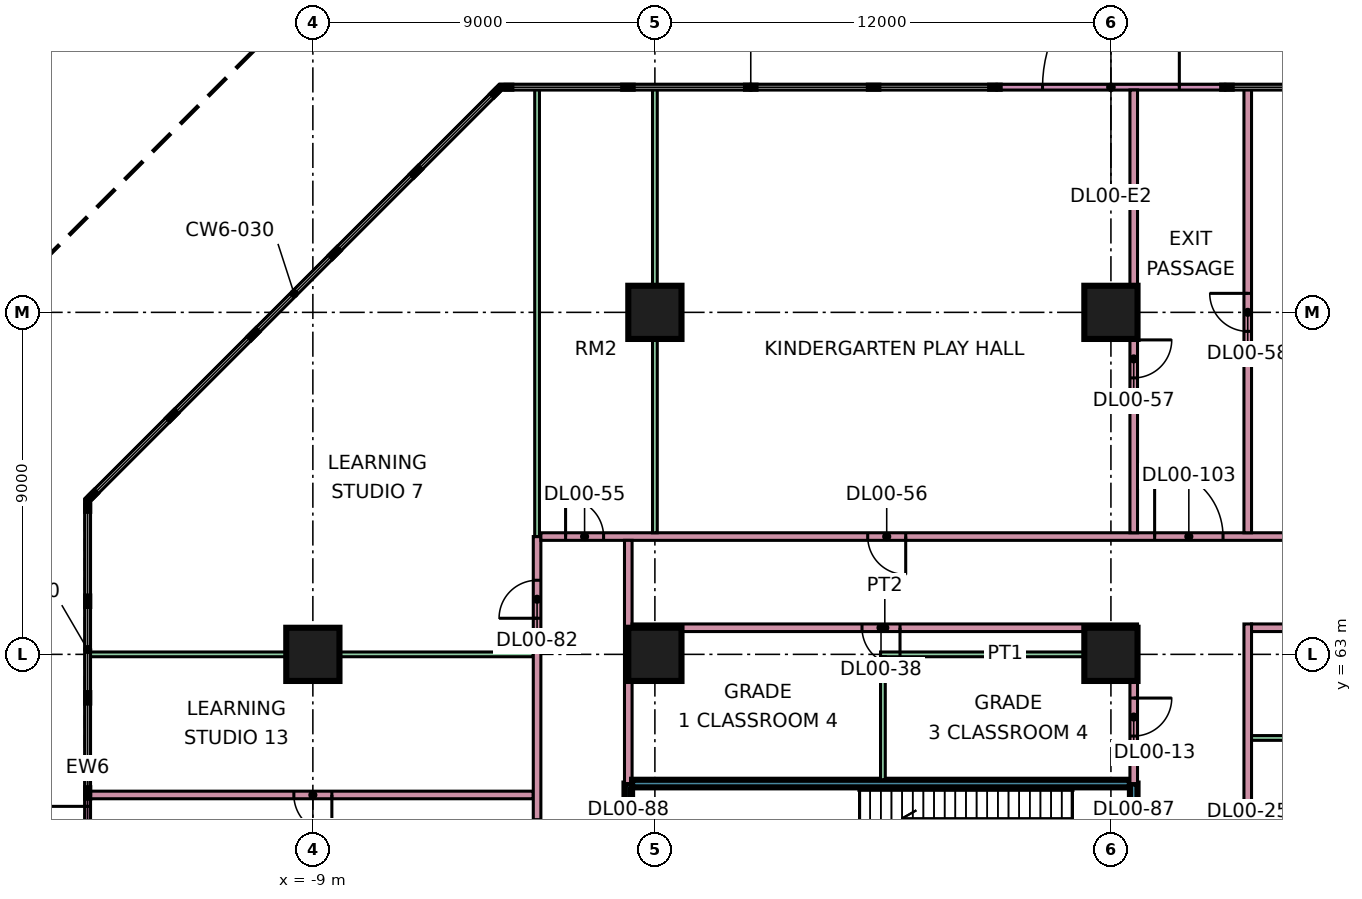
"""IFC4 building model, lengths in metres.
Left out: names, types, materials, properties, quantities, classifications, styles, units other than length and angle.
Written with IfcOpenShell. Run it as: python <this file> out.ifc"""

import sys

from ifc_helpers import new_model, si_unit, direction, frame, frame_2d, origin, origin_2d, place, context, subcontext, project, spatial, rectangle, extrude, element, fill, save


model = new_model("IFC4")
c1 = context("Model", 3, precision=1e-05, world=origin(), true_north=direction((0.0, 1.0)))
c2 = subcontext(c1, "Body", "Model", "MODEL_VIEW")
j1 = project(units=[si_unit("LENGTHUNIT", "METRE"), si_unit("PLANEANGLEUNIT", "RADIAN")], contexts=[c1])
p1 = place(None, origin())
s1 = spatial("IfcSite", under=j1, at=p1, CompositionType="ELEMENT")
p2 = place(p1, origin())
s2 = spatial("IfcBuilding", under=s1, at=p2, CompositionType="ELEMENT")
p3 = place(p2, origin())
s3 = spatial("IfcBuildingStorey", under=s2, at=p3, CompositionType="ELEMENT", Elevation=0.0)
for number, where, z_axis, x_axis in (
    (1, (-9.0, 63.0, 0.0), (0.0, 0.0, 1.0), (1.0, 0.0, 0.0)),
    (2, (0.0, 63.0, 0.0), (0.0, 0.0, 1.0), (1.0, 0.0, 0.0)),
    (3, (12.0, 63.0, 0.0), (0.0, 0.0, 1.0), (1.0, 0.0, 0.0)),
    (4, (0.0, 72.0, 0.0), (0.0, 0.0, 1.0), (1.0, 0.0, 0.0)),
    (5, (12.0, 72.0, 0.0), (0.0, 0.0, 1.0), (1.0, 0.0, 0.0)),
):
    element("IfcColumn", number, at=place(p3, frame(where, z_axis=z_axis, x_axis=x_axis)), inside=s3, PredefinedType="COLUMN", context=c2, shape_type="SweptSolid", body=[
        extrude(rectangle(XDim=1.4, YDim=1.4, at=origin_2d()), origin(), (0.0, 0.0, 1.0), 7.2),
    ])
p4 = place(p3, frame((15.0, 77.925, 0.0), z_axis=(0.0, 0.0, 1.0), x_axis=(-1.0, 0.0, 0.0)))
e6 = element("IfcWall", 6, at=p4, inside=s3, PredefinedType="SOLIDWALL", context=c2, shape_type="SweptSolid", body=[
    extrude(rectangle(XDim=6.0, YDim=0.15, at=frame_2d((3.0, 0.0))), origin(), (0.0, 0.0, 1.0), 6.8),
])
p5 = place(p4, frame((1.2, 0.0, 0.0)))
e7 = element("IfcOpeningElement", 7, at=p5, cuts=e6, PredefinedType="OPENING", context=c2, shape_type="SweptSolid", body=[
    extrude(rectangle(XDim=3.6, YDim=2.8, at=frame_2d((1.8, 1.4))), frame((0.0, 0.085, 0.0), z_axis=(0.0, -1.0, 0.0), x_axis=(1.0, 0.0, 0.0)), (0.0, 0.0, 1.0), 0.17),
])
p6 = place(p3, frame((-14.925, 59.3, 0.0), z_axis=(0.0, 0.0, 1.0), x_axis=(0.0, -1.0, 0.0)))
e8 = element("IfcWall", 8, at=p6, inside=s3, PredefinedType="SOLIDWALL", context=c2, shape_type="SweptSolid", body=[
    extrude(rectangle(XDim=3.0, YDim=0.15, at=frame_2d((1.5, 0.0))), origin(), (0.0, 0.0, 1.0), 6.8),
])
p7 = place(p6, frame((0.3, 0.0, 0.0)))
e9 = element("IfcOpeningElement", 9, at=p7, cuts=e8, PredefinedType="OPENING", context=c2, shape_type="SweptSolid", body=[
    extrude(rectangle(XDim=2.4, YDim=2.4, at=frame_2d((1.2, 1.2))), frame((0.0, 0.085, 0.0), z_axis=(0.0, -1.0, 0.0), x_axis=(1.0, 0.0, 0.0)), (0.0, 0.0, 1.0), 0.17),
])
p8 = place(p3, frame((-14.925, 59.3, 0.0), z_axis=(0.0, 0.0, 1.0), x_axis=(1.0, 0.0, 0.0)))
e10 = element("IfcWall", 10, at=p8, inside=s3, PredefinedType="PARTITIONING", context=c2, shape_type="SweptSolid", body=[
    extrude(rectangle(XDim=11.725, YDim=0.2, at=frame_2d((5.863, 0.0))), origin(), (0.0, 0.0, 1.0), 6.8),
])
p9 = place(p8, frame((5.425, 0.0, 0.0)))
e11 = element("IfcOpeningElement", 11, at=p9, cuts=e10, PredefinedType="OPENING", context=c2, shape_type="SweptSolid", body=[
    extrude(rectangle(XDim=1.0, YDim=2.1, at=frame_2d((0.5, 1.05))), frame((0.0, 0.11, 0.0), z_axis=(0.0, -1.0, 0.0), x_axis=(1.0, 0.0, 0.0)), (0.0, 0.0, 1.0), 0.22),
])
p10 = place(p3, frame((-14.925, 63.0, 0.0), z_axis=(0.0, 0.0, 1.0), x_axis=(1.0, 0.0, 0.0)))
e12 = element("IfcWall", 12, at=p10, inside=s3, PredefinedType="PARTITIONING", context=c2, shape_type="SweptSolid", body=[
    extrude(rectangle(XDim=11.725, YDim=0.125, at=frame_2d((5.863, 0.0))), origin(), (0.0, 0.0, 1.0), 6.8),
])
p11 = place(p3, frame((-3.1, -3.0, 0.0), z_axis=(0.0, 0.0, 1.0), x_axis=(0.0, 1.0, 0.0)))
e13 = element("IfcWall", 13, at=p11, inside=s3, PredefinedType="PARTITIONING", context=c2, shape_type="SweptSolid", body=[
    extrude(rectangle(XDim=69.1, YDim=0.2, at=frame_2d((34.55, 0.0))), origin(), (0.0, 0.0, 1.0), 6.8),
])
p12 = place(p11, frame((8.6, 0.0, 0.0)))
e14 = element("IfcOpeningElement", 14, at=p12, cuts=e13, PredefinedType="OPENING", context=c2, shape_type="SweptSolid", body=[
    extrude(rectangle(XDim=1.0, YDim=2.1, at=frame_2d((0.5, 1.05))), frame((0.0, 0.11, 0.0), z_axis=(0.0, -1.0, 0.0), x_axis=(1.0, 0.0, 0.0)), (0.0, 0.0, 1.0), 0.22),
])
p13 = place(p11, frame((13.85, 0.0, 0.0)))
e15 = element("IfcOpeningElement", 15, at=p13, cuts=e13, PredefinedType="OPENING", context=c2, shape_type="SweptSolid", body=[
    extrude(rectangle(XDim=1.0, YDim=2.1, at=frame_2d((0.5, 1.05))), frame((0.0, 0.11, 0.0), z_axis=(0.0, -1.0, 0.0), x_axis=(1.0, 0.0, 0.0)), (0.0, 0.0, 1.0), 0.22),
])
p14 = place(p11, frame((18.6, 0.0, 0.0)))
e16 = element("IfcOpeningElement", 16, at=p14, cuts=e13, PredefinedType="OPENING", context=c2, shape_type="SweptSolid", body=[
    extrude(rectangle(XDim=1.0, YDim=2.1, at=frame_2d((0.5, 1.05))), frame((0.0, 0.11, 0.0), z_axis=(0.0, -1.0, 0.0), x_axis=(1.0, 0.0, 0.0)), (0.0, 0.0, 1.0), 0.22),
])
p15 = place(p11, frame((66.95, 0.0, 0.0)))
e17 = element("IfcOpeningElement", 17, at=p15, cuts=e13, PredefinedType="OPENING", context=c2, shape_type="SweptSolid", body=[
    extrude(rectangle(XDim=1.0, YDim=2.1, at=frame_2d((0.5, 1.05))), frame((0.0, 0.11, 0.0), z_axis=(0.0, -1.0, 0.0), x_axis=(1.0, 0.0, 0.0)), (0.0, 0.0, 1.0), 0.22),
])
p16 = place(p11, frame((59.85, 0.0, 0.0)))
e18 = element("IfcOpeningElement", 18, at=p16, cuts=e13, PredefinedType="OPENING", context=c2, shape_type="SweptSolid", body=[
    extrude(rectangle(XDim=1.8, YDim=2.1, at=frame_2d((0.9, 1.05))), frame((0.0, 0.11, 0.0), z_axis=(0.0, -1.0, 0.0), x_axis=(1.0, 0.0, 0.0)), (0.0, 0.0, 1.0), 0.22),
])
p17 = place(p11, frame((49.85, 0.0, 0.0)))
e19 = element("IfcOpeningElement", 19, at=p17, cuts=e13, PredefinedType="OPENING", context=c2, shape_type="SweptSolid", body=[
    extrude(rectangle(XDim=1.8, YDim=2.1, at=frame_2d((0.9, 1.05))), frame((0.0, 0.11, 0.0), z_axis=(0.0, -1.0, 0.0), x_axis=(1.0, 0.0, 0.0)), (0.0, 0.0, 1.0), 0.22),
])
p18 = place(p11, frame((29.85, 0.0, 0.0)))
e20 = element("IfcOpeningElement", 20, at=p18, cuts=e13, PredefinedType="OPENING", context=c2, shape_type="SweptSolid", body=[
    extrude(rectangle(XDim=1.8, YDim=2.1, at=frame_2d((0.9, 1.05))), frame((0.0, 0.11, 0.0), z_axis=(0.0, -1.0, 0.0), x_axis=(1.0, 0.0, 0.0)), (0.0, 0.0, 1.0), 0.22),
])
p19 = place(p11, frame((39.6, 0.0, 0.0)))
e21 = element("IfcOpeningElement", 21, at=p19, cuts=e13, PredefinedType="OPENING", context=c2, shape_type="SweptSolid", body=[
    extrude(rectangle(XDim=1.8, YDim=2.1, at=frame_2d((0.9, 1.05))), frame((0.0, 0.11, 0.0), z_axis=(0.0, -1.0, 0.0), x_axis=(1.0, 0.0, 0.0)), (0.0, 0.0, 1.0), 0.22),
])
p20 = place(p11, frame((23.55, 0.0, 0.0)))
e22 = element("IfcOpeningElement", 22, at=p20, cuts=e13, PredefinedType="OPENING", context=c2, shape_type="SweptSolid", body=[
    extrude(rectangle(XDim=1.8, YDim=2.1, at=frame_2d((0.9, 1.05))), frame((0.0, 0.11, 0.0), z_axis=(0.0, -1.0, 0.0), x_axis=(1.0, 0.0, 0.0)), (0.0, 0.0, 1.0), 0.22),
])
p21 = place(p3, frame((-3.1, 66.1, 0.0), z_axis=(0.0, 0.0, 1.0), x_axis=(0.0, 1.0, 0.0)))
e23 = element("IfcWall", 23, at=p21, inside=s3, PredefinedType="PARTITIONING", context=c2, shape_type="SweptSolid", body=[
    extrude(rectangle(XDim=11.825, YDim=0.125, at=frame_2d((5.913, 0.0))), origin(), (0.0, 0.0, 1.0), 6.8),
])
p22 = place(p3, frame((-3.0, 66.1, 0.0), z_axis=(0.0, 0.0, 1.0), x_axis=(1.0, 0.0, 0.0)))
e24 = element("IfcWall", 24, at=p22, inside=s3, PredefinedType="PARTITIONING", context=c2, shape_type="SweptSolid", body=[
    extrude(rectangle(XDim=30.0, YDim=0.2, at=frame_2d((15.0, 0.0))), origin(), (0.0, 0.0, 1.0), 6.8),
])
p23 = place(p22, frame((0.65, 0.0, 0.0)))
e25 = element("IfcOpeningElement", 25, at=p23, cuts=e24, PredefinedType="OPENING", context=c2, shape_type="SweptSolid", body=[
    extrude(rectangle(XDim=1.0, YDim=2.1, at=frame_2d((0.5, 1.05))), frame((0.0, 0.11, 0.0), z_axis=(0.0, -1.0, 0.0), x_axis=(1.0, 0.0, 0.0)), (0.0, 0.0, 1.0), 0.22),
])
p24 = place(p22, frame((8.6, 0.0, 0.0)))
e26 = element("IfcOpeningElement", 26, at=p24, cuts=e24, PredefinedType="OPENING", context=c2, shape_type="SweptSolid", body=[
    extrude(rectangle(XDim=1.0, YDim=2.1, at=frame_2d((0.5, 1.05))), frame((0.0, 0.11, 0.0), z_axis=(0.0, -1.0, 0.0), x_axis=(1.0, 0.0, 0.0)), (0.0, 0.0, 1.0), 0.22),
])
p25 = place(p22, frame((22.35, 0.0, 0.0)))
e27 = element("IfcOpeningElement", 27, at=p25, cuts=e24, PredefinedType="OPENING", context=c2, shape_type="SweptSolid", body=[
    extrude(rectangle(XDim=1.0, YDim=2.1, at=frame_2d((0.5, 1.05))), frame((0.0, 0.11, 0.0), z_axis=(0.0, -1.0, 0.0), x_axis=(1.0, 0.0, 0.0)), (0.0, 0.0, 1.0), 0.22),
])
p26 = place(p22, frame((28.45, 0.0, 0.0)))
e28 = element("IfcOpeningElement", 28, at=p26, cuts=e24, PredefinedType="OPENING", context=c2, shape_type="SweptSolid", body=[
    extrude(rectangle(XDim=1.0, YDim=2.1, at=frame_2d((0.5, 1.05))), frame((0.0, 0.11, 0.0), z_axis=(0.0, -1.0, 0.0), x_axis=(1.0, 0.0, 0.0)), (0.0, 0.0, 1.0), 0.22),
])
p27 = place(p22, frame((16.15, 0.0, 0.0)))
e29 = element("IfcOpeningElement", 29, at=p27, cuts=e24, PredefinedType="OPENING", context=c2, shape_type="SweptSolid", body=[
    extrude(rectangle(XDim=1.8, YDim=2.1, at=frame_2d((0.9, 1.05))), frame((0.0, 0.11, 0.0), z_axis=(0.0, -1.0, 0.0), x_axis=(1.0, 0.0, 0.0)), (0.0, 0.0, 1.0), 0.22),
])
p28 = place(p3, frame((-0.7, 54.0, 0.0), z_axis=(0.0, 0.0, 1.0), x_axis=(0.0, 1.0, 0.0)))
e30 = element("IfcWall", 30, at=p28, inside=s3, PredefinedType="SOLIDWALL", context=c2, shape_type="SweptSolid", body=[
    extrude(rectangle(XDim=5.6, YDim=0.2, at=frame_2d((2.8, 0.0))), origin(), (0.0, 0.0, 1.0), 6.8),
])
p29 = place(p28, frame((3.2, 0.0, 0.0)))
e31 = element("IfcOpeningElement", 31, at=p29, cuts=e30, PredefinedType="OPENING", context=c2, shape_type="SweptSolid", body=[
    extrude(rectangle(XDim=1.2, YDim=2.1, at=frame_2d((0.6, 1.05))), frame((0.0, 0.11, 0.0), z_axis=(0.0, -1.0, 0.0), x_axis=(1.0, 0.0, 0.0)), (0.0, 0.0, 1.0), 0.22),
])
p30 = place(p3, frame((-0.7, 59.6, 0.0), z_axis=(0.0, 0.0, 1.0), x_axis=(0.0, 1.0, 0.0)))
e32 = element("IfcWall", 32, at=p30, inside=s3, PredefinedType="PARTITIONING", context=c2, shape_type="SweptSolid", body=[
    extrude(rectangle(XDim=6.4, YDim=0.2, at=frame_2d((3.2, 0.0))), origin(), (0.0, 0.0, 1.0), 6.8),
])
p31 = place(p3, frame((-0.6, 59.6, 0.0), z_axis=(0.0, 0.0, 1.0), x_axis=(1.0, 0.0, 0.0)))
e33 = element("IfcWall", 33, at=p31, inside=s3, PredefinedType="SOLIDWALL", context=c2, shape_type="SweptSolid", body=[
    extrude(rectangle(XDim=13.1, YDim=0.2, at=frame_2d((6.55, 0.0))), origin(), (0.0, 0.0, 1.0), 6.8),
])
p32 = place(p3, frame((-0.6, 63.7, 0.0), z_axis=(0.0, 0.0, 1.0), x_axis=(1.0, 0.0, 0.0)))
e34 = element("IfcWall", 34, at=p32, inside=s3, PredefinedType="PARTITIONING", context=c2, shape_type="SweptSolid", body=[
    extrude(rectangle(XDim=13.3, YDim=0.2, at=frame_2d((6.65, 0.0))), origin(), (0.0, 0.0, 1.0), 6.8),
])
p33 = place(p32, frame((6.05, 0.0, 0.0)))
e35 = element("IfcOpeningElement", 35, at=p33, cuts=e34, PredefinedType="OPENING", context=c2, shape_type="SweptSolid", body=[
    extrude(rectangle(XDim=1.0, YDim=2.1, at=frame_2d((0.5, 1.05))), frame((0.0, 0.11, 0.0), z_axis=(0.0, -1.0, 0.0), x_axis=(1.0, 0.0, 0.0)), (0.0, 0.0, 1.0), 0.22),
])
p34 = place(p3, frame((0.0, 66.2, 0.0), z_axis=(0.0, 0.0, 1.0), x_axis=(0.0, 1.0, 0.0)))
e36 = element("IfcWall", 36, at=p34, inside=s3, PredefinedType="PARTITIONING", context=c2, shape_type="SweptSolid", body=[
    extrude(rectangle(XDim=11.725, YDim=0.125, at=frame_2d((5.863, 0.0))), origin(), (0.0, 0.0, 1.0), 6.8),
])
p35 = place(p3, frame((5.938, 63.0, 0.0), z_axis=(0.0, 0.0, 1.0), x_axis=(1.0, 0.0, 0.0)))
e37 = element("IfcWall", 37, at=p35, inside=s3, PredefinedType="PARTITIONING", context=c2, shape_type="SweptSolid", body=[
    extrude(rectangle(XDim=6.562, YDim=0.125, at=frame_2d((3.281, 0.0))), origin(), (0.0, 0.0, 1.0), 6.8),
])
p36 = place(p3, frame((6.0, 59.7, 0.0), z_axis=(0.0, 0.0, 1.0), x_axis=(0.0, 1.0, 0.0)))
e38 = element("IfcWall", 38, at=p36, inside=s3, PredefinedType="PARTITIONING", context=c2, shape_type="SweptSolid", body=[
    extrude(rectangle(XDim=3.238, YDim=0.125, at=frame_2d((1.619, 0.0))), origin(), (0.0, 0.0, 1.0), 6.8),
])
p37 = place(p3, frame((12.6, 54.0, 0.0), z_axis=(0.0, 0.0, 1.0), x_axis=(0.0, 1.0, 0.0)))
e39 = element("IfcWall", 39, at=p37, inside=s3, PredefinedType="SOLIDWALL", context=c2, shape_type="SweptSolid", body=[
    extrude(rectangle(XDim=5.6, YDim=0.2, at=frame_2d((2.8, 0.0))), origin(), (0.0, 0.0, 1.0), 6.8),
])
p38 = place(p37, frame((3.2, 0.0, 0.0)))
e40 = element("IfcOpeningElement", 40, at=p38, cuts=e39, PredefinedType="OPENING", context=c2, shape_type="SweptSolid", body=[
    extrude(rectangle(XDim=1.2, YDim=2.1, at=frame_2d((0.6, 1.05))), frame((0.0, 0.11, 0.0), z_axis=(0.0, -1.0, 0.0), x_axis=(1.0, 0.0, 0.0)), (0.0, 0.0, 1.0), 0.22),
])
p39 = place(p3, frame((12.6, 59.6, 0.0), z_axis=(0.0, 0.0, 1.0), x_axis=(0.0, 1.0, 0.0)))
e41 = element("IfcWall", 41, at=p39, inside=s3, PredefinedType="PARTITIONING", context=c2, shape_type="SweptSolid", body=[
    extrude(rectangle(XDim=4.0, YDim=0.2, at=frame_2d((2.0, 0.0))), origin(), (0.0, 0.0, 1.0), 6.8),
])
p40 = place(p39, frame((1.25, 0.0, 0.0)))
e42 = element("IfcOpeningElement", 42, at=p40, cuts=e41, PredefinedType="OPENING", context=c2, shape_type="SweptSolid", body=[
    extrude(rectangle(XDim=1.0, YDim=2.1, at=frame_2d((0.5, 1.05))), frame((0.0, 0.11, 0.0), z_axis=(0.0, -1.0, 0.0), x_axis=(1.0, 0.0, 0.0)), (0.0, 0.0, 1.0), 0.22),
])
p41 = place(p3, frame((12.6, 66.2, 0.0), z_axis=(0.0, 0.0, 1.0), x_axis=(0.0, 1.0, 0.0)))
e43 = element("IfcWall", 43, at=p41, inside=s3, PredefinedType="PARTITIONING", context=c2, shape_type="SweptSolid", body=[
    extrude(rectangle(XDim=11.651, YDim=0.2, at=frame_2d((5.826, 0.0))), origin(), (0.0, 0.0, 1.0), 6.8),
])
p42 = place(p41, frame((4.075, 0.0, 0.0)))
e44 = element("IfcOpeningElement", 44, at=p42, cuts=e43, PredefinedType="OPENING", context=c2, shape_type="SweptSolid", body=[
    extrude(rectangle(XDim=1.0, YDim=2.1, at=frame_2d((0.5, 1.05))), frame((0.0, 0.11, 0.0), z_axis=(0.0, -1.0, 0.0), x_axis=(1.0, 0.0, 0.0)), (0.0, 0.0, 1.0), 0.22),
])
p43 = place(p3, frame((15.6, 51.225, 0.0), z_axis=(0.0, 0.0, 1.0), x_axis=(0.0, 1.0, 0.0)))
e45 = element("IfcWall", 45, at=p43, inside=s3, PredefinedType="PARTITIONING", context=c2, shape_type="SweptSolid", body=[
    extrude(rectangle(XDim=12.575, YDim=0.2, at=frame_2d((6.288, 0.0))), origin(), (0.0, 0.0, 1.0), 6.8),
])
p44 = place(p43, frame((6.025, 0.0, 0.0)))
e46 = element("IfcOpeningElement", 46, at=p44, cuts=e45, PredefinedType="OPENING", context=c2, shape_type="SweptSolid", body=[
    extrude(rectangle(XDim=1.0, YDim=2.1, at=frame_2d((0.5, 1.05))), frame((0.0, 0.11, 0.0), z_axis=(0.0, -1.0, 0.0), x_axis=(1.0, 0.0, 0.0)), (0.0, 0.0, 1.0), 0.22),
])
p45 = place(p3, frame((15.6, 66.2, 0.0), z_axis=(0.0, 0.0, 1.0), x_axis=(0.0, 1.0, 0.0)))
e47 = element("IfcWall", 47, at=p45, inside=s3, PredefinedType="PARTITIONING", context=c2, shape_type="SweptSolid", body=[
    extrude(rectangle(XDim=11.725, YDim=0.2, at=frame_2d((5.863, 0.0))), origin(), (0.0, 0.0, 1.0), 6.8),
])
p46 = place(p45, frame((5.3, 0.0, 0.0)))
e48 = element("IfcOpeningElement", 48, at=p46, cuts=e47, PredefinedType="OPENING", context=c2, shape_type="SweptSolid", body=[
    extrude(rectangle(XDim=1.0, YDim=2.1, at=frame_2d((0.5, 1.05))), frame((0.0, 0.11, 0.0), z_axis=(0.0, -1.0, 0.0), x_axis=(1.0, 0.0, 0.0)), (0.0, 0.0, 1.0), 0.22),
])
p47 = place(p3, frame((15.7, 60.8, 0.0), z_axis=(0.0, 0.0, 1.0), x_axis=(1.0, 0.0, 0.0)))
e49 = element("IfcWall", 49, at=p47, inside=s3, PredefinedType="PARTITIONING", context=c2, shape_type="SweptSolid", body=[
    extrude(rectangle(XDim=8.9, YDim=0.125, at=frame_2d((4.45, 0.0))), origin(), (0.0, 0.0, 1.0), 6.8),
])
p48 = place(p3, frame((15.7, 63.7, 0.0), z_axis=(0.0, 0.0, 1.0), x_axis=(1.0, 0.0, 0.0)))
e50 = element("IfcWall", 50, at=p48, inside=s3, PredefinedType="PARTITIONING", context=c2, shape_type="SweptSolid", body=[
    extrude(rectangle(XDim=8.9, YDim=0.2, at=frame_2d((4.45, 0.0))), origin(), (0.0, 0.0, 1.0), 6.8),
])
p49 = place(p48, frame((4.05, 0.0, 0.0)))
e51 = element("IfcOpeningElement", 51, at=p49, cuts=e50, PredefinedType="OPENING", context=c2, shape_type="SweptSolid", body=[
    extrude(rectangle(XDim=1.0, YDim=2.1, at=frame_2d((0.5, 1.05))), frame((0.0, 0.11, 0.0), z_axis=(0.0, -1.0, 0.0), x_axis=(1.0, 0.0, 0.0)), (0.0, 0.0, 1.0), 0.22),
])
p50 = place(p5, frame((3.6, 0.0, 0.0), z_axis=(0.0, 0.0, 1.0), x_axis=(-1.0, 0.0, 0.0)))
e52 = element("IfcDoor", 52, at=p50, inside=s3, OperationType="DOUBLE_DOOR_SINGLE_SWING", PredefinedType="DOOR", context=c2, shape_type="SweptSolid", body=[
    extrude(rectangle(XDim=3.6, YDim=2.8, at=frame_2d((1.8, 1.4))), frame((0.0, 0.025, 0.0), z_axis=(0.0, -1.0, 0.0), x_axis=(1.0, 0.0, 0.0)), (0.0, 0.0, 1.0), 0.05),
])
fill(e7, e52)
p51 = place(p7, frame((2.4, 0.0, 0.0), z_axis=(0.0, 0.0, 1.0), x_axis=(-1.0, 0.0, 0.0)))
e53 = element("IfcDoor", 53, at=p51, inside=s3, OperationType="DOUBLE_DOOR_SINGLE_SWING", PredefinedType="DOOR", context=c2, shape_type="SweptSolid", body=[
    extrude(rectangle(XDim=2.4, YDim=2.4, at=frame_2d((1.2, 1.2))), frame((0.0, 0.025, 0.0), z_axis=(0.0, -1.0, 0.0), x_axis=(1.0, 0.0, 0.0)), (0.0, 0.0, 1.0), 0.05),
])
fill(e9, e53)
p52 = place(p40, origin())
e54 = element("IfcDoor", 54, at=p52, inside=s3, OperationType="SINGLE_SWING_RIGHT", PredefinedType="DOOR", context=c2, shape_type="SweptSolid", body=[
    extrude(rectangle(XDim=1.0, YDim=2.1, at=frame_2d((0.5, 1.05))), frame((0.0, 0.025, 0.0), z_axis=(0.0, -1.0, 0.0), x_axis=(1.0, 0.0, 0.0)), (0.0, 0.0, 1.0), 0.05),
])
fill(e42, e54)
p53 = place(p33, origin())
e55 = element("IfcDoor", 55, at=p53, inside=s3, OperationType="SINGLE_SWING_RIGHT", PredefinedType="DOOR", context=c2, shape_type="SweptSolid", body=[
    extrude(rectangle(XDim=1.0, YDim=2.1, at=frame_2d((0.5, 1.05))), frame((0.0, 0.025, 0.0), z_axis=(0.0, -1.0, 0.0), x_axis=(1.0, 0.0, 0.0)), (0.0, 0.0, 1.0), 0.05),
])
fill(e35, e55)
p54 = place(p23, origin())
e56 = element("IfcDoor", 56, at=p54, inside=s3, OperationType="SINGLE_SWING_LEFT", PredefinedType="DOOR", context=c2, shape_type="SweptSolid", body=[
    extrude(rectangle(XDim=1.0, YDim=2.1, at=frame_2d((0.5, 1.05))), frame((0.0, 0.025, 0.0), z_axis=(0.0, -1.0, 0.0), x_axis=(1.0, 0.0, 0.0)), (0.0, 0.0, 1.0), 0.05),
])
fill(e25, e56)
p55 = place(p24, origin())
e57 = element("IfcDoor", 57, at=p55, inside=s3, OperationType="SINGLE_SWING_RIGHT", PredefinedType="DOOR", context=c2, shape_type="SweptSolid", body=[
    extrude(rectangle(XDim=1.0, YDim=2.1, at=frame_2d((0.5, 1.05))), frame((0.0, 0.025, 0.0), z_axis=(0.0, -1.0, 0.0), x_axis=(1.0, 0.0, 0.0)), (0.0, 0.0, 1.0), 0.05),
])
fill(e26, e57)
p56 = place(p42, origin())
e58 = element("IfcDoor", 58, at=p56, inside=s3, OperationType="SINGLE_SWING_RIGHT", PredefinedType="DOOR", context=c2, shape_type="SweptSolid", body=[
    extrude(rectangle(XDim=1.0, YDim=2.1, at=frame_2d((0.5, 1.05))), frame((0.0, 0.025, 0.0), z_axis=(0.0, -1.0, 0.0), x_axis=(1.0, 0.0, 0.0)), (0.0, 0.0, 1.0), 0.05),
])
fill(e44, e58)
p57 = place(p46, frame((1.0, 0.0, 0.0), z_axis=(0.0, 0.0, 1.0), x_axis=(-1.0, 0.0, 0.0)))
e59 = element("IfcDoor", 59, at=p57, inside=s3, OperationType="SINGLE_SWING_RIGHT", PredefinedType="DOOR", context=c2, shape_type="SweptSolid", body=[
    extrude(rectangle(XDim=1.0, YDim=2.1, at=frame_2d((0.5, 1.05))), frame((0.0, 0.025, 0.0), z_axis=(0.0, -1.0, 0.0), x_axis=(1.0, 0.0, 0.0)), (0.0, 0.0, 1.0), 0.05),
])
fill(e48, e59)
p58 = place(p9, origin())
e60 = element("IfcDoor", 60, at=p58, inside=s3, OperationType="SINGLE_SWING_RIGHT", PredefinedType="DOOR", context=c2, shape_type="SweptSolid", body=[
    extrude(rectangle(XDim=1.0, YDim=2.1, at=frame_2d((0.5, 1.05))), frame((0.0, 0.025, 0.0), z_axis=(0.0, -1.0, 0.0), x_axis=(1.0, 0.0, 0.0)), (0.0, 0.0, 1.0), 0.05),
])
fill(e11, e60)
p59 = place(p15, origin())
e61 = element("IfcDoor", 61, at=p59, inside=s3, OperationType="SINGLE_SWING_LEFT", PredefinedType="DOOR", context=c2, shape_type="SweptSolid", body=[
    extrude(rectangle(XDim=1.0, YDim=2.1, at=frame_2d((0.5, 1.05))), frame((0.0, 0.025, 0.0), z_axis=(0.0, -1.0, 0.0), x_axis=(1.0, 0.0, 0.0)), (0.0, 0.0, 1.0), 0.05),
])
fill(e17, e61)
p60 = place(p27, origin())
e62 = element("IfcDoor", 62, at=p60, inside=s3, OperationType="DOUBLE_DOOR_SINGLE_SWING", PredefinedType="DOOR", context=c2, shape_type="SweptSolid", body=[
    extrude(rectangle(XDim=1.8, YDim=2.1, at=frame_2d((0.9, 1.05))), frame((0.0, 0.025, 0.0), z_axis=(0.0, -1.0, 0.0), x_axis=(1.0, 0.0, 0.0)), (0.0, 0.0, 1.0), 0.05),
])
fill(e29, e62)
save(model, sys.argv[1])
